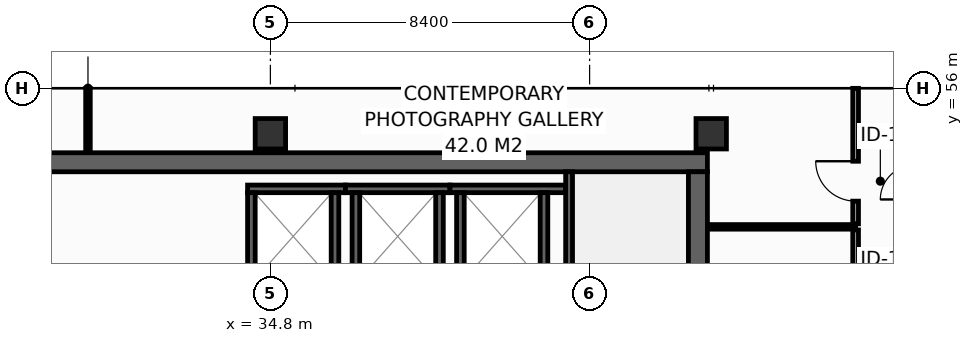
"""IFC4 building model, lengths in metres.
Left out: names, types, materials, properties, quantities, classifications, styles, units other than length and angle.
Written with IfcOpenShell. Run it as: python <this file> out.ifc"""

import sys

from ifc_helpers import new_model, si_unit, direction, frame, frame_2d, origin, origin_2d, place, context, subcontext, project, spatial, rectangle, hollow_rectangle, extrude, element, fill, save


model = new_model("IFC4")
c1 = context("Model", 3, precision=1e-05, world=origin(), true_north=direction((0.0, 1.0)))
c2 = subcontext(c1, "Body", "Model", "MODEL_VIEW")
j1 = project(units=[si_unit("LENGTHUNIT", "METRE"), si_unit("PLANEANGLEUNIT", "RADIAN")], contexts=[c1])
p1 = place(None, origin())
s1 = spatial("IfcSite", under=j1, at=p1, CompositionType="ELEMENT")
p2 = place(p1, origin())
s2 = spatial("IfcBuilding", under=s1, at=p2, CompositionType="ELEMENT")
p3 = place(p2, frame((0.0, 0.0, 201.8)))
s3 = spatial("IfcBuildingStorey", under=s2, at=p3, CompositionType="ELEMENT", Elevation=201.8)
p4 = place(p3, frame((13.6, 54.05, 0.0), z_axis=(0.0, 0.0, 1.0), x_axis=(1.0, 0.0, 0.0)))
e1 = element("IfcWall", 1, at=p4, inside=s3, PredefinedType="SHEAR", context=c2, shape_type="SweptSolid", body=[
    extrude(rectangle(XDim=32.7, YDim=0.5, at=frame_2d((16.35, 0.0))), origin(), (0.0, 0.0, 1.0), 3.55),
])
p5 = place(p3, frame((46.05, 43.4, 0.0), z_axis=(0.0, 0.0, 1.0), x_axis=(0.0, 1.0, 0.0)))
e2 = element("IfcWall", 2, at=p5, inside=s3, PredefinedType="SHEAR", context=c2, shape_type="SweptSolid", body=[
    extrude(rectangle(XDim=10.4, YDim=0.5, at=frame_2d((5.2, 0.0))), origin(), (0.0, 0.0, 1.0), 3.55),
])
for number, where, z_axis, x_axis in (
    (3, (34.8, 54.8, 0.0), (0.0, 0.0, 1.0), (1.0, 0.0, 0.0)),
    (4, (46.4, 54.8, 0.0), (0.0, 0.0, 1.0), (1.0, 0.0, 0.0)),
):
    element("IfcColumn", number, at=place(p3, frame(where, z_axis=z_axis, x_axis=x_axis)), inside=s3, PredefinedType="COLUMN", context=c2, shape_type="SweptSolid", body=[
        extrude(hollow_rectangle(XDim=0.8, YDim=0.8, WallThickness=0.036, at=origin_2d()), origin(), (0.0, 0.0, 1.0), 3.8),
    ])
p6 = place(p3, frame((34.2, 53.35, 0.0), z_axis=(0.0, 0.0, 1.0), x_axis=(1.0, 0.0, 0.0)))
e5 = element("IfcWall", 5, at=p6, inside=s3, PredefinedType="SHEAR", context=c2, shape_type="SweptSolid", body=[
    extrude(rectangle(XDim=2.575, YDim=0.2, at=frame_2d((1.288, 0.0))), origin(), (0.0, 0.0, 1.0), 3.55),
])
for number, where, z_axis, x_axis in (
    (6, (34.3, 50.95, 0.0), (0.0, 0.0, 1.0), (0.0, 1.0, 0.0)),
    (7, (36.5, 50.95, 0.0), (0.0, 0.0, 1.0), (0.0, 1.0, 0.0)),
):
    element("IfcWall", number, at=place(p3, frame(where, z_axis=z_axis, x_axis=x_axis)), inside=s3, PredefinedType="SHEAR", context=c2, shape_type="SweptSolid", body=[
        extrude(rectangle(XDim=2.3, YDim=0.2, at=frame_2d((1.15, 0.0))), origin(), (0.0, 0.0, 1.0), 3.55),
    ])
p7 = place(p3, frame((36.775, 53.35, 0.0), z_axis=(0.0, 0.0, 1.0), x_axis=(1.0, 0.0, 0.0)))
e8 = element("IfcWall", 8, at=p7, inside=s3, PredefinedType="SHEAR", context=c2, shape_type="SweptSolid", body=[
    extrude(rectangle(XDim=2.75, YDim=0.2, at=frame_2d((1.375, 0.0))), origin(), (0.0, 0.0, 1.0), 3.55),
])
for number, where, z_axis, x_axis in (
    (9, (37.05, 50.95, 0.0), (0.0, 0.0, 1.0), (0.0, 1.0, 0.0)),
    (10, (39.25, 50.95, 0.0), (0.0, 0.0, 1.0), (0.0, 1.0, 0.0)),
):
    element("IfcWall", number, at=place(p3, frame(where, z_axis=z_axis, x_axis=x_axis)), inside=s3, PredefinedType="SHEAR", context=c2, shape_type="SweptSolid", body=[
        extrude(rectangle(XDim=2.3, YDim=0.2, at=frame_2d((1.15, 0.0))), origin(), (0.0, 0.0, 1.0), 3.55),
    ])
p8 = place(p3, frame((39.525, 53.35, 0.0), z_axis=(0.0, 0.0, 1.0), x_axis=(1.0, 0.0, 0.0)))
e11 = element("IfcWall", 11, at=p8, inside=s3, PredefinedType="SHEAR", context=c2, shape_type="SweptSolid", body=[
    extrude(rectangle(XDim=3.045, YDim=0.2, at=frame_2d((1.522, 0.0))), origin(), (0.0, 0.0, 1.0), 3.55),
])
for number, where, z_axis, x_axis in (
    (12, (39.8, 50.95, 0.0), (0.0, 0.0, 1.0), (0.0, 1.0, 0.0)),
    (13, (42.0, 50.95, 0.0), (0.0, 0.0, 1.0), (0.0, 1.0, 0.0)),
):
    element("IfcWall", number, at=place(p3, frame(where, z_axis=z_axis, x_axis=x_axis)), inside=s3, PredefinedType="SHEAR", context=c2, shape_type="SweptSolid", body=[
        extrude(rectangle(XDim=2.3, YDim=0.2, at=frame_2d((1.15, 0.0))), origin(), (0.0, 0.0, 1.0), 3.55),
    ])
p9 = place(p3, frame((42.66, 53.8, 0.0), z_axis=(0.0, 0.0, 1.0), x_axis=(0.0, -1.0, 0.0)))
e14 = element("IfcWall", 14, at=p9, inside=s3, PredefinedType="SHEAR", context=c2, shape_type="SweptSolid", body=[
    extrude(rectangle(XDim=10.4, YDim=0.18, at=frame_2d((5.2, 0.0))), origin(), (0.0, 0.0, 1.0), 3.55),
])
p10 = place(p9, frame((8.99, 0.0, 0.0)))
e15 = element("IfcOpeningElement", 15, at=p10, cuts=e14, PredefinedType="OPENING", context=c2, shape_type="SweptSolid", body=[
    extrude(rectangle(XDim=1.1, YDim=2.15, at=frame_2d((0.55, 1.075))), frame((0.0, 0.1, 0.0), z_axis=(0.0, -1.0, 0.0), x_axis=(1.0, 0.0, 0.0)), (0.0, 0.0, 1.0), 0.2),
])
p11 = place(p3, frame((46.32, 52.35, 0.0), z_axis=(0.0, 0.0, 1.0), x_axis=(1.0, 0.0, 0.0)))
e16 = element("IfcWall", 16, at=p11, inside=s3, PredefinedType="PARTITIONING", context=c2, shape_type="SweptSolid", body=[
    extrude(rectangle(XDim=3.88, YDim=0.12, at=frame_2d((1.94, 0.0))), origin(), (0.0, 0.0, 1.0), 3.55),
])
p12 = place(p3, frame((30.0, 54.32, 0.0), z_axis=(0.0, 0.0, 1.0), x_axis=(0.0, 1.0, 0.0)))
e17 = element("IfcWall", 17, at=p12, inside=s3, PredefinedType="PARTITIONING", context=c2, shape_type="SweptSolid", body=[
    extrude(rectangle(XDim=1.675, YDim=0.12, at=frame_2d((0.837, 0.0))), origin(), (0.0, 0.0, 1.0), 2.935),
])
p13 = place(p3, frame((50.2, 48.29, 0.0), z_axis=(0.0, 0.0, 1.0), x_axis=(0.0, 1.0, 0.0)))
e18 = element("IfcWall", 18, at=p13, inside=s3, PredefinedType="PARTITIONING", context=c2, shape_type="SweptSolid", body=[
    extrude(rectangle(XDim=3.98, YDim=0.15, at=frame_2d((1.99, 0.0))), origin(), (0.0, 0.0, 1.0), 3.55),
])
p14 = place(p13, frame((1.465, 0.0, 0.0)))
e19 = element("IfcOpeningElement", 19, at=p14, cuts=e18, PredefinedType="OPENING", context=c2, shape_type="SweptSolid", body=[
    extrude(rectangle(XDim=1.05, YDim=2.15, at=frame_2d((0.525, 1.075))), frame((0.0, 0.085, 0.0), z_axis=(0.0, -1.0, 0.0), x_axis=(1.0, 0.0, 0.0)), (0.0, 0.0, 1.0), 0.17),
])
p15 = place(p3, frame((50.2, 52.43, 0.0), z_axis=(0.0, 0.0, 1.0), x_axis=(0.0, 1.0, 0.0)))
e20 = element("IfcWall", 20, at=p15, inside=s3, PredefinedType="PARTITIONING", context=c2, shape_type="SweptSolid", body=[
    extrude(rectangle(XDim=3.565, YDim=0.15, at=frame_2d((1.783, 0.0))), origin(), (0.0, 0.0, 1.0), 2.935),
])
p16 = place(p15, frame((0.597, 0.0, 0.0)))
e21 = element("IfcOpeningElement", 21, at=p16, cuts=e20, PredefinedType="OPENING", context=c2, shape_type="SweptSolid", body=[
    extrude(rectangle(XDim=1.05, YDim=2.15, at=frame_2d((0.525, 1.075))), frame((0.0, 0.085, 0.0), z_axis=(0.0, -1.0, 0.0), x_axis=(1.0, 0.0, 0.0)), (0.0, 0.0, 1.0), 0.17),
])
p17 = place(p16, origin())
e22 = element("IfcDoor", 22, at=p17, inside=s3, OperationType="SINGLE_SWING_RIGHT", PredefinedType="DOOR", context=c2, shape_type="SweptSolid", body=[
    extrude(rectangle(XDim=1.05, YDim=2.15, at=frame_2d((0.525, 1.075))), frame((0.0, 0.025, 0.0), z_axis=(0.0, -1.0, 0.0), x_axis=(1.0, 0.0, 0.0)), (0.0, 0.0, 1.0), 0.05),
])
fill(e21, e22)
save(model, sys.argv[1])
